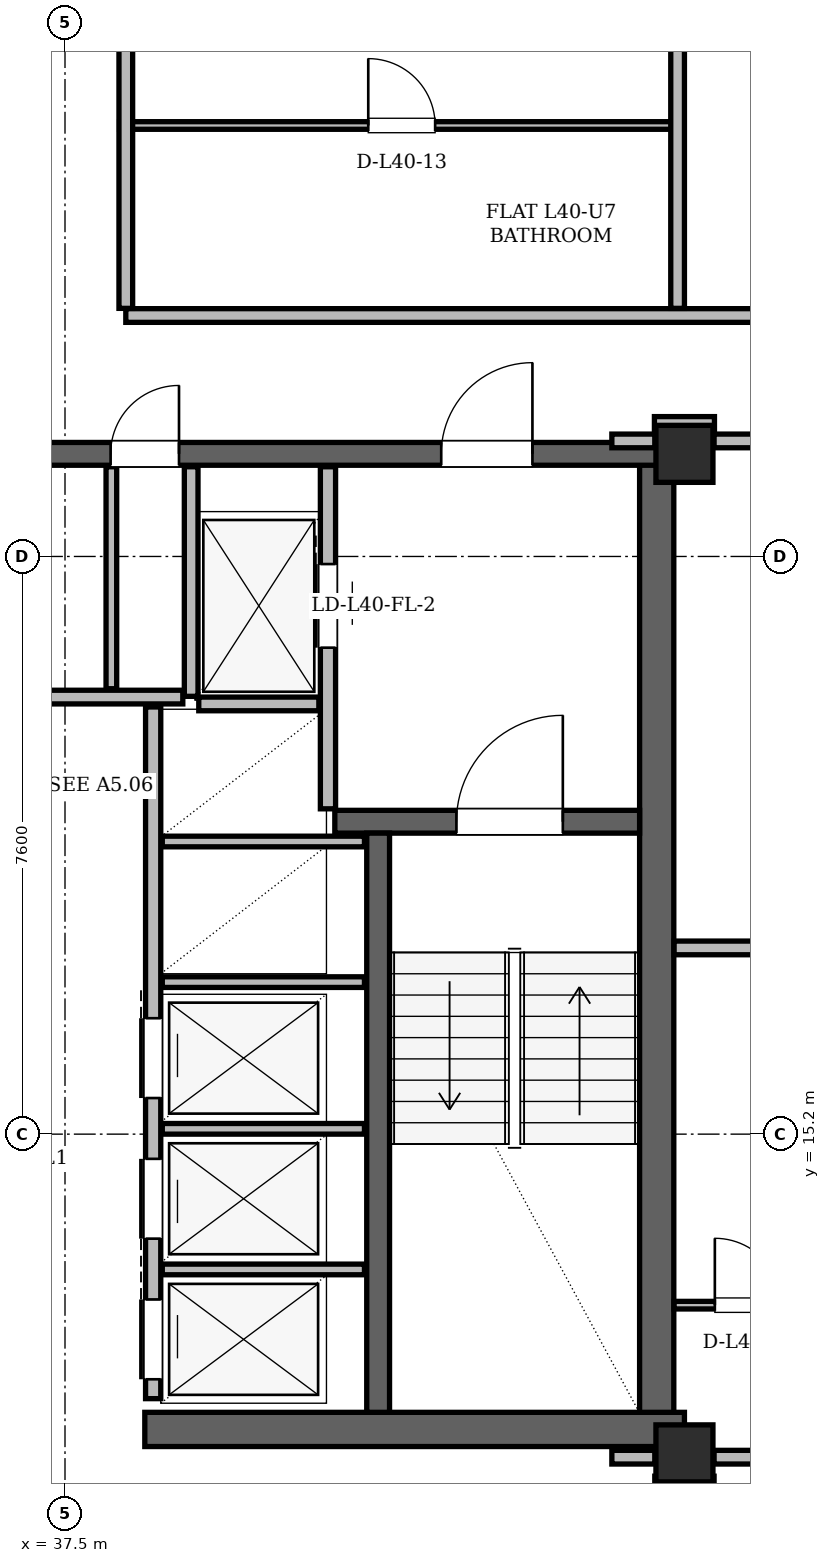
"""IFC4 building model, lengths in metres.
Left out: names, types, materials, properties, quantities, classifications, styles, units other than length and angle.
Written with IfcOpenShell. Run it as: python <this file> out.ifc"""

import sys

from ifc_helpers import new_model, si_unit, direction, frame, frame_2d, origin, origin_2d, place, context, subcontext, project, spatial, rectangle, hollow_rectangle, extrude, element, fill, save


model = new_model("IFC4")
c1 = context("Model", 3, precision=1e-05, world=origin(), true_north=direction((0.0, 1.0)))
c2 = subcontext(c1, "Body", "Model", "MODEL_VIEW")
j1 = project(units=[si_unit("LENGTHUNIT", "METRE"), si_unit("PLANEANGLEUNIT", "RADIAN")], contexts=[c1])
p1 = place(None, origin())
s1 = spatial("IfcSite", under=j1, at=p1, CompositionType="ELEMENT")
p2 = place(p1, origin())
s2 = spatial("IfcBuilding", under=s1, at=p2, CompositionType="ELEMENT")
p3 = place(p2, frame((0.0, 0.0, 153.0)))
s3 = spatial("IfcBuildingStorey", under=s2, at=p3, CompositionType="ELEMENT", Elevation=153.0)
for number, where, z_axis, x_axis in (
    (1, (45.65, 11.0, 0.0), (0.0, 0.0, 1.0), (1.0, 0.0, 0.0)),
    (2, (45.65, 24.15, 0.0), (0.0, 0.0, 1.0), (1.0, 0.0, 0.0)),
):
    element("IfcColumn", number, at=place(p3, frame(where, z_axis=z_axis, x_axis=x_axis)), inside=s3, PredefinedType="COLUMN", context=c2, shape_type="SweptSolid", body=[
        extrude(hollow_rectangle(XDim=0.75, YDim=0.75, WallThickness=0.06, at=origin_2d()), origin(), (0.0, 0.0, 1.0), 3.6),
    ])
p4 = place(p3, frame((45.285, 11.0, 0.0), z_axis=(0.0, 0.0, 1.0), x_axis=(0.0, 1.0, 0.0)))
e3 = element("IfcWall", 3, at=p4, inside=s3, PredefinedType="SHEAR", context=c2, shape_type="SweptSolid", body=[
    extrude(rectangle(XDim=13.3, YDim=0.45, at=frame_2d((6.65, 0.0))), origin(), (0.0, 0.0, 1.0), 3.38),
])
p5 = place(p3, frame((38.55, 11.315, 0.0), z_axis=(0.0, 0.0, 1.0), x_axis=(1.0, 0.0, 0.0)))
e4 = element("IfcWall", 4, at=p5, inside=s3, PredefinedType="SHEAR", context=c2, shape_type="SweptSolid", body=[
    extrude(rectangle(XDim=7.1, YDim=0.45, at=frame_2d((3.55, 0.0))), origin(), (0.0, 0.0, 1.0), 3.38),
])
p6 = place(p3, frame((29.65, 24.15, 0.0), z_axis=(0.0, 0.0, 1.0), x_axis=(1.0, 0.0, 0.0)))
e5 = element("IfcWall", 5, at=p6, inside=s3, PredefinedType="SHEAR", context=c2, shape_type="SweptSolid", body=[
    extrude(rectangle(XDim=15.7, YDim=0.3, at=frame_2d((7.85, 0.0))), origin(), (0.0, 0.0, 1.0), 3.38),
])
p7 = place(p6, frame((1.7, 0.0, 0.0)))
e6 = element("IfcOpeningElement", 6, at=p7, cuts=e5, PredefinedType="OPENING", context=c2, shape_type="SweptSolid", body=[
    extrude(rectangle(XDim=1.2, YDim=2.2, at=frame_2d((0.6, 1.1))), frame((0.0, 0.15, 0.0), z_axis=(0.0, -1.0, 0.0), x_axis=(1.0, 0.0, 0.0)), (0.0, 0.0, 1.0), 0.3),
])
p8 = place(p6, frame((12.8, 0.0, 0.0)))
e7 = element("IfcOpeningElement", 7, at=p8, cuts=e5, PredefinedType="OPENING", context=c2, shape_type="SweptSolid", body=[
    extrude(rectangle(XDim=1.2, YDim=2.2, at=frame_2d((0.6, 1.1))), frame((0.0, 0.15, 0.0), z_axis=(0.0, -1.0, 0.0), x_axis=(1.0, 0.0, 0.0)), (0.0, 0.0, 1.0), 0.3),
])
p9 = place(p6, frame((6.55, 0.0, 0.0)))
e8 = element("IfcOpeningElement", 8, at=p9, cuts=e5, PredefinedType="OPENING", context=c2, shape_type="SweptSolid", body=[
    extrude(rectangle(XDim=0.9, YDim=2.05, at=frame_2d((0.45, 1.025))), frame((0.0, 0.15, 0.0), z_axis=(0.0, -1.0, 0.0), x_axis=(1.0, 0.0, 0.0)), (0.0, 0.0, 1.0), 0.3),
])
p10 = place(p6, frame((8.45, 0.0, 0.0)))
e9 = element("IfcOpeningElement", 9, at=p10, cuts=e5, PredefinedType="OPENING", context=c2, shape_type="SweptSolid", body=[
    extrude(rectangle(XDim=0.9, YDim=2.05, at=frame_2d((0.45, 1.025))), frame((0.0, 0.15, 0.0), z_axis=(0.0, -1.0, 0.0), x_axis=(1.0, 0.0, 0.0)), (0.0, 0.0, 1.0), 0.3),
])
p11 = place(p3, frame((41.05, 19.31, 0.0), z_axis=(0.0, 0.0, 1.0), x_axis=(1.0, 0.0, 0.0)))
e10 = element("IfcWall", 10, at=p11, inside=s3, PredefinedType="SHEAR", context=c2, shape_type="SweptSolid", body=[
    extrude(rectangle(XDim=4.01, YDim=0.3, at=frame_2d((2.005, 0.0))), origin(), (0.0, 0.0, 1.0), 3.38),
])
p12 = place(p11, frame((1.6, 0.0, 0.0)))
e11 = element("IfcOpeningElement", 11, at=p12, cuts=e10, PredefinedType="OPENING", context=c2, shape_type="SweptSolid", body=[
    extrude(rectangle(XDim=1.4, YDim=2.2, at=frame_2d((0.7, 1.1))), frame((0.0, 0.15, 0.0), z_axis=(0.0, -1.0, 0.0), x_axis=(1.0, 0.0, 0.0)), (0.0, 0.0, 1.0), 0.3),
])
p13 = place(p3, frame((41.62, 11.54, 0.0), z_axis=(0.0, 0.0, 1.0), x_axis=(0.0, 1.0, 0.0)))
e12 = element("IfcWall", 12, at=p13, inside=s3, PredefinedType="SHEAR", context=c2, shape_type="SweptSolid", body=[
    extrude(rectangle(XDim=7.62, YDim=0.3, at=frame_2d((3.81, 0.0))), origin(), (0.0, 0.0, 1.0), 3.38),
])
p14 = place(p3, frame((59.952, 12.544, 0.0), z_axis=(0.0, 0.0, 1.0), x_axis=(-0.500000946011, 0.866024857604, 0.0)))
e13 = element("IfcWall", 13, at=p14, inside=s3, PredefinedType="SOLIDWALL", context=c2, shape_type="SweptSolid", body=[
    extrude(rectangle(XDim=35.54, YDim=0.34, at=frame_2d((17.77, 0.0))), origin(), (0.0, 0.0, 1.0), 2.6),
])
p15 = place(p14, frame((6.579, 0.0, 0.0)))
e14 = element("IfcOpeningElement", 14, at=p15, cuts=e13, PredefinedType="OPENING", context=c2, shape_type="SweptSolid", body=[
    extrude(rectangle(XDim=1.5, YDim=2.2, at=frame_2d((0.75, 1.1))), frame((0.0, 0.17, 0.0), z_axis=(0.0, -1.0, 0.0), x_axis=(1.0, 0.0, 0.0)), (0.0, 0.0, 1.0), 0.34),
])
p16 = place(p14, frame((26.105, 0.0, 0.0)))
e15 = element("IfcOpeningElement", 15, at=p16, cuts=e13, PredefinedType="OPENING", context=c2, shape_type="SweptSolid", body=[
    extrude(rectangle(XDim=1.3, YDim=2.2, at=frame_2d((0.65, 1.1))), frame((0.0, 0.17, 0.0), z_axis=(0.0, -1.0, 0.0), x_axis=(1.0, 0.0, 0.0)), (0.0, 0.0, 1.0), 0.34),
])
p17 = place(p14, frame((0.816, 0.0, 0.85)))
e16 = element("IfcOpeningElement", 16, at=p17, cuts=e13, PredefinedType="OPENING", context=c2, shape_type="SweptSolid", body=[
    extrude(rectangle(XDim=1.2, YDim=1.48, at=frame_2d((0.6, 0.74))), frame((0.0, 0.17, 0.0), z_axis=(0.0, -1.0, 0.0), x_axis=(1.0, 0.0, 0.0)), (0.0, 0.0, 1.0), 0.34),
])
p18 = place(p14, frame((17.181, 0.0, 0.85)))
e17 = element("IfcOpeningElement", 17, at=p18, cuts=e13, PredefinedType="OPENING", context=c2, shape_type="SweptSolid", body=[
    extrude(rectangle(XDim=2.6, YDim=1.64, at=frame_2d((1.3, 0.82))), frame((0.0, 0.17, 0.0), z_axis=(0.0, -1.0, 0.0), x_axis=(1.0, 0.0, 0.0)), (0.0, 0.0, 1.0), 0.34),
])
p19 = place(p14, frame((22.978, 0.0, 0.85)))
e18 = element("IfcOpeningElement", 18, at=p19, cuts=e13, PredefinedType="OPENING", context=c2, shape_type="SweptSolid", body=[
    extrude(rectangle(XDim=1.2, YDim=1.48, at=frame_2d((0.6, 0.74))), frame((0.0, 0.17, 0.0), z_axis=(0.0, -1.0, 0.0), x_axis=(1.0, 0.0, 0.0)), (0.0, 0.0, 1.0), 0.34),
])
p20 = place(p14, frame((13.303, 0.0, 0.85)))
e19 = element("IfcOpeningElement", 19, at=p20, cuts=e13, PredefinedType="OPENING", context=c2, shape_type="SweptSolid", body=[
    extrude(rectangle(XDim=1.6, YDim=1.64, at=frame_2d((0.8, 0.82))), frame((0.0, 0.17, 0.0), z_axis=(0.0, -1.0, 0.0), x_axis=(1.0, 0.0, 0.0)), (0.0, 0.0, 1.0), 0.34),
])
p21 = place(p14, frame((31.32, 0.0, 0.85)))
e20 = element("IfcOpeningElement", 20, at=p21, cuts=e13, PredefinedType="OPENING", context=c2, shape_type="SweptSolid", body=[
    extrude(rectangle(XDim=3.0, YDim=1.64, at=frame_2d((1.5, 0.82))), frame((0.0, 0.17, 0.0), z_axis=(0.0, -1.0, 0.0), x_axis=(1.0, 0.0, 0.0)), (0.0, 0.0, 1.0), 0.34),
])
p22 = place(p3, frame((40.96, 19.48, 0.0), z_axis=(0.0, 0.0, 1.0), x_axis=(0.0, 1.0, 0.0)))
e21 = element("IfcWall", 21, at=p22, inside=s3, PredefinedType="PARTITIONING", context=c2, shape_type="SweptSolid", body=[
    extrude(rectangle(XDim=4.5, YDim=0.2, at=frame_2d((2.25, 0.0))), origin(), (0.0, 0.0, 1.0), 2.42),
])
p23 = place(p22, frame((2.12, 0.0, 0.0)))
e22 = element("IfcOpeningElement", 22, at=p23, cuts=e21, PredefinedType="OPENING", context=c2, shape_type="SweptSolid", body=[
    extrude(rectangle(XDim=1.1, YDim=2.2, at=frame_2d((0.55, 1.1))), frame((0.0, 0.1, 0.0), z_axis=(0.0, -1.0, 0.0), x_axis=(1.0, 0.0, 0.0)), (0.0, 0.0, 1.0), 0.2),
])
p24 = place(p3, frame((39.16, 20.96, 0.0), z_axis=(0.0, 0.0, 1.0), x_axis=(0.0, 1.0, 0.0)))
e23 = element("IfcWall", 23, at=p24, inside=s3, PredefinedType="PARTITIONING", context=c2, shape_type="SweptSolid", body=[
    extrude(rectangle(XDim=3.02, YDim=0.18, at=frame_2d((1.51, 0.0))), origin(), (0.0, 0.0, 1.0), 2.42),
])
p25 = place(p3, frame((39.26, 20.86, 0.0), z_axis=(0.0, 0.0, 1.0), x_axis=(1.0, 0.0, 0.0)))
e24 = element("IfcWall", 24, at=p25, inside=s3, PredefinedType="PARTITIONING", context=c2, shape_type="SweptSolid", body=[
    extrude(rectangle(XDim=1.58, YDim=0.18, at=frame_2d((0.79, 0.0))), origin(), (0.0, 0.0, 1.0), 3.38),
])
p26 = place(p3, frame((38.66, 11.72, 0.0), z_axis=(0.0, 0.0, 1.0), x_axis=(0.0, 1.0, 0.0)))
e25 = element("IfcWall", 25, at=p26, inside=s3, PredefinedType="PARTITIONING", context=c2, shape_type="SweptSolid", body=[
    extrude(rectangle(XDim=9.1, YDim=0.2, at=frame_2d((4.55, 0.0))), origin(), (0.0, 0.0, 1.0), 3.38),
])
p27 = place(p26, frame((0.255, 0.0, 0.0)))
e26 = element("IfcOpeningElement", 26, at=p27, cuts=e25, PredefinedType="OPENING", context=c2, shape_type="SweptSolid", body=[
    extrude(rectangle(XDim=1.05, YDim=2.15, at=frame_2d((0.525, 1.075))), frame((0.0, 0.1, 0.0), z_axis=(0.0, -1.0, 0.0), x_axis=(1.0, 0.0, 0.0)), (0.0, 0.0, 1.0), 0.2),
])
p28 = place(p26, frame((2.105, 0.0, 0.0)))
e27 = element("IfcOpeningElement", 27, at=p28, cuts=e25, PredefinedType="OPENING", context=c2, shape_type="SweptSolid", body=[
    extrude(rectangle(XDim=1.05, YDim=2.15, at=frame_2d((0.525, 1.075))), frame((0.0, 0.1, 0.0), z_axis=(0.0, -1.0, 0.0), x_axis=(1.0, 0.0, 0.0)), (0.0, 0.0, 1.0), 0.2),
])
p29 = place(p26, frame((3.955, 0.0, 0.0)))
e28 = element("IfcOpeningElement", 28, at=p29, cuts=e25, PredefinedType="OPENING", context=c2, shape_type="SweptSolid", body=[
    extrude(rectangle(XDim=1.05, YDim=2.15, at=frame_2d((0.525, 1.075))), frame((0.0, 0.1, 0.0), z_axis=(0.0, -1.0, 0.0), x_axis=(1.0, 0.0, 0.0)), (0.0, 0.0, 1.0), 0.2),
])
for number, where, z_axis, x_axis in (
    (29, (38.78, 13.42, 0.0), (0.0, 0.0, 1.0), (1.0, 0.0, 0.0)),
    (30, (38.78, 15.27, 0.0), (0.0, 0.0, 1.0), (1.0, 0.0, 0.0)),
    (31, (38.78, 17.2, 0.0), (0.0, 0.0, 1.0), (1.0, 0.0, 0.0)),
    (32, (38.78, 19.05, 0.0), (0.0, 0.0, 1.0), (1.0, 0.0, 0.0)),
):
    element("IfcWall", number, at=place(p3, frame(where, z_axis=z_axis, x_axis=x_axis)), inside=s3, PredefinedType="PARTITIONING", context=c2, shape_type="SweptSolid", body=[
        extrude(rectangle(XDim=2.66, YDim=0.14, at=frame_2d((1.33, 0.0))), origin(), (0.0, 0.0, 1.0), 3.38),
    ])
p30 = place(p3, frame((35.95, 20.95, 0.0), z_axis=(0.0, 0.0, 1.0), x_axis=(1.0, 0.0, 0.0)))
e33 = element("IfcWall", 33, at=p30, inside=s3, PredefinedType="PARTITIONING", context=c2, shape_type="SweptSolid", body=[
    extrude(rectangle(XDim=3.1, YDim=0.18, at=frame_2d((1.55, 0.0))), origin(), (0.0, 0.0, 1.0), 3.38),
])
p31 = place(p3, frame((38.11, 21.06, 0.0), z_axis=(0.0, 0.0, 1.0), x_axis=(0.0, 1.0, 0.0)))
e34 = element("IfcWall", 34, at=p31, inside=s3, PredefinedType="PARTITIONING", context=c2, shape_type="SweptSolid", body=[
    extrude(rectangle(XDim=2.92, YDim=0.14, at=frame_2d((1.46, 0.0))), origin(), (0.0, 0.0, 1.0), 2.42),
])
p32 = place(p3, frame((45.26, 10.61, 0.0), z_axis=(0.0, 0.0, 1.0), x_axis=(1.0, 0.0, 0.0)))
e35 = element("IfcWall", 35, at=p32, inside=s3, PredefinedType="PARTITIONING", context=c2, shape_type="SweptSolid", body=[
    extrude(rectangle(XDim=0.78, YDim=0.18, at=frame_2d((0.39, 0.0))), origin(), (0.0, 0.0, 1.0), 3.38),
])
p33 = place(p3, frame((44.695, 10.95, 0.0), z_axis=(0.0, 0.0, 1.0), x_axis=(1.0, 0.0, 0.0)))
e36 = element("IfcWall", 36, at=p33, inside=s3, PredefinedType="PARTITIONING", context=c2, shape_type="SweptSolid", body=[
    extrude(rectangle(XDim=0.565, YDim=0.18, at=frame_2d((0.282, 0.0))), origin(), (0.0, 0.0, 1.0), 2.42),
])
p34 = place(p3, frame((46.04, 10.95, 0.0), z_axis=(0.0, 0.0, 1.0), x_axis=(1.0, 0.0, 0.0)))
e37 = element("IfcWall", 37, at=p34, inside=s3, PredefinedType="PARTITIONING", context=c2, shape_type="SweptSolid", body=[
    extrude(rectangle(XDim=3.96, YDim=0.18, at=frame_2d((1.98, 0.0))), origin(), (0.0, 0.0, 1.0), 2.842),
])
p35 = place(p3, frame((45.514, 12.95, 0.0), z_axis=(0.0, 0.0, 1.0), x_axis=(1.0, 0.0, 0.0)))
e38 = element("IfcWall", 38, at=p35, inside=s3, PredefinedType="PARTITIONING", context=c2, shape_type="SweptSolid", body=[
    extrude(rectangle(XDim=14.003, YDim=0.1, at=frame_2d((7.001, 0.0))), origin(), (0.0, 0.0, 1.0), 2.42),
])
p36 = place(p35, frame((0.536, 0.0, 0.0)))
e39 = element("IfcOpeningElement", 39, at=p36, cuts=e38, PredefinedType="OPENING", context=c2, shape_type="SweptSolid", body=[
    extrude(rectangle(XDim=0.88, YDim=2.08, at=frame_2d((0.44, 1.04))), frame((0.0, 0.05, 0.0), z_axis=(0.0, -1.0, 0.0), x_axis=(1.0, 0.0, 0.0)), (0.0, 0.0, 1.0), 0.1),
])
p37 = place(p35, frame((2.538, 0.0, 0.0)))
e40 = element("IfcOpeningElement", 40, at=p37, cuts=e38, PredefinedType="OPENING", context=c2, shape_type="SweptSolid", body=[
    extrude(rectangle(XDim=0.95, YDim=2.1, at=frame_2d((0.475, 1.05))), frame((0.0, 0.05, 0.0), z_axis=(0.0, -1.0, 0.0), x_axis=(1.0, 0.0, 0.0)), (0.0, 0.0, 1.0), 0.1),
])
p38 = place(p35, frame((8.616, 0.0, 0.0)))
e41 = element("IfcOpeningElement", 41, at=p38, cuts=e38, PredefinedType="OPENING", context=c2, shape_type="SweptSolid", body=[
    extrude(rectangle(XDim=0.92, YDim=2.12, at=frame_2d((0.46, 1.06))), frame((0.0, 0.05, 0.0), z_axis=(0.0, -1.0, 0.0), x_axis=(1.0, 0.0, 0.0)), (0.0, 0.0, 1.0), 0.1),
])
p39 = place(p3, frame((45.514, 17.65, 0.0), z_axis=(0.0, 0.0, 1.0), x_axis=(1.0, 0.0, 0.0)))
e42 = element("IfcWall", 42, at=p39, inside=s3, PredefinedType="PARTITIONING", context=c2, shape_type="SweptSolid", body=[
    extrude(rectangle(XDim=11.289, YDim=0.18, at=frame_2d((5.645, 0.0))), origin(), (0.0, 0.0, 1.0), 2.42),
])
p40 = place(p3, frame((44.695, 24.32, 0.0), z_axis=(0.0, 0.0, 1.0), x_axis=(1.0, 0.0, 0.0)))
e43 = element("IfcWall", 43, at=p40, inside=s3, PredefinedType="PARTITIONING", context=c2, shape_type="SweptSolid", body=[
    extrude(rectangle(XDim=0.565, YDim=0.18, at=frame_2d((0.282, 0.0))), origin(), (0.0, 0.0, 1.0), 2.42),
])
p41 = place(p3, frame((46.04, 24.32, 0.0), z_axis=(0.0, 0.0, 1.0), x_axis=(1.0, 0.0, 0.0)))
e44 = element("IfcWall", 44, at=p41, inside=s3, PredefinedType="PARTITIONING", context=c2, shape_type="SweptSolid", body=[
    extrude(rectangle(XDim=3.96, YDim=0.18, at=frame_2d((1.98, 0.0))), origin(), (0.0, 0.0, 1.0), 3.38),
])
p42 = place(p3, frame((45.255, 24.55, 0.0), z_axis=(0.0, 0.0, 1.0), x_axis=(1.0, 0.0, 0.0)))
e45 = element("IfcWall", 45, at=p42, inside=s3, PredefinedType="PARTITIONING", context=c2, shape_type="SweptSolid", body=[
    extrude(rectangle(XDim=0.79, YDim=0.18, at=frame_2d((0.395, 0.0))), origin(), (0.0, 0.0, 1.0), 2.842),
])
p43 = place(p3, frame((38.3, 25.97, 0.0), z_axis=(0.0, 0.0, 1.0), x_axis=(1.0, 0.0, 0.0)))
e46 = element("IfcWall", 46, at=p43, inside=s3, PredefinedType="PARTITIONING", context=c2, shape_type="SweptSolid", body=[
    extrude(rectangle(XDim=11.7, YDim=0.18, at=frame_2d((5.85, 0.0))), origin(), (0.0, 0.0, 1.0), 2.842),
])
p44 = place(p43, frame((9.832, 0.0, 0.0)))
e47 = element("IfcOpeningElement", 47, at=p44, cuts=e46, PredefinedType="OPENING", context=c2, shape_type="SweptSolid", body=[
    extrude(rectangle(XDim=1.0, YDim=2.18, at=frame_2d((0.5, 1.09))), frame((0.0, 0.09, 0.0), z_axis=(0.0, -1.0, 0.0), x_axis=(1.0, 0.0, 0.0)), (0.0, 0.0, 1.0), 0.18),
])
p45 = place(p3, frame((38.218, 28.47, 0.0), z_axis=(0.0, 0.0, 1.0), x_axis=(1.0, 0.0, 0.0)))
e48 = element("IfcWall", 48, at=p45, inside=s3, PredefinedType="PARTITIONING", context=c2, shape_type="SweptSolid", body=[
    extrude(rectangle(XDim=7.424, YDim=0.1, at=frame_2d((3.712, 0.0))), origin(), (0.0, 0.0, 1.0), 3.38),
])
p46 = place(p45, frame((3.272, 0.0, 0.0)))
e49 = element("IfcOpeningElement", 49, at=p46, cuts=e48, PredefinedType="OPENING", context=c2, shape_type="SweptSolid", body=[
    extrude(rectangle(XDim=0.88, YDim=2.08, at=frame_2d((0.44, 1.04))), frame((0.0, 0.05, 0.0), z_axis=(0.0, -1.0, 0.0), x_axis=(1.0, 0.0, 0.0)), (0.0, 0.0, 1.0), 0.1),
])
p47 = place(p3, frame((38.3, 26.064, 0.0), z_axis=(0.0, 0.0, 1.0), x_axis=(0.0, 1.0, 0.0)))
e50 = element("IfcWall", 50, at=p47, inside=s3, PredefinedType="PARTITIONING", context=c2, shape_type="SweptSolid", body=[
    extrude(rectangle(XDim=13.442, YDim=0.18, at=frame_2d((6.721, 0.0))), origin(), (0.0, 0.0, 1.0), 3.38),
])
p48 = place(p47, frame((7.149, 0.0, 0.0)))
e51 = element("IfcOpeningElement", 51, at=p48, cuts=e50, PredefinedType="OPENING", context=c2, shape_type="SweptSolid", body=[
    extrude(rectangle(XDim=1.0, YDim=2.18, at=frame_2d((0.5, 1.09))), frame((0.0, 0.09, 0.0), z_axis=(0.0, -1.0, 0.0), x_axis=(1.0, 0.0, 0.0)), (0.0, 0.0, 1.0), 0.18),
])
p49 = place(p3, frame((45.56, 26.064, 0.0), z_axis=(0.0, 0.0, 1.0), x_axis=(0.0, 1.0, 0.0)))
e52 = element("IfcWall", 52, at=p49, inside=s3, PredefinedType="PARTITIONING", context=c2, shape_type="SweptSolid", body=[
    extrude(rectangle(XDim=11.06, YDim=0.18, at=frame_2d((5.53, 0.0))), origin(), (0.0, 0.0, 1.0), 3.38),
])
p50 = place(p23, origin())
e53 = element("IfcDoor", 53, at=p50, inside=s3, OperationType="SLIDING_TO_RIGHT", PredefinedType="DOOR", context=c2, shape_type="SweptSolid", body=[
    extrude(rectangle(XDim=1.1, YDim=2.2, at=frame_2d((0.55, 1.1))), frame((0.0, 0.025, 0.0), z_axis=(0.0, -1.0, 0.0), x_axis=(1.0, 0.0, 0.0)), (0.0, 0.0, 1.0), 0.05),
])
fill(e22, e53)
p51 = place(p27, origin())
e54 = element("IfcDoor", 54, at=p51, inside=s3, OperationType="SLIDING_TO_RIGHT", PredefinedType="DOOR", context=c2, shape_type="SweptSolid", body=[
    extrude(rectangle(XDim=1.05, YDim=2.15, at=frame_2d((0.525, 1.075))), frame((0.0, 0.025, 0.0), z_axis=(0.0, -1.0, 0.0), x_axis=(1.0, 0.0, 0.0)), (0.0, 0.0, 1.0), 0.05),
])
fill(e26, e54)
p52 = place(p28, origin())
e55 = element("IfcDoor", 55, at=p52, inside=s3, OperationType="SLIDING_TO_LEFT", PredefinedType="DOOR", context=c2, shape_type="SweptSolid", body=[
    extrude(rectangle(XDim=1.05, YDim=2.15, at=frame_2d((0.525, 1.075))), frame((0.0, 0.025, 0.0), z_axis=(0.0, -1.0, 0.0), x_axis=(1.0, 0.0, 0.0)), (0.0, 0.0, 1.0), 0.05),
])
fill(e27, e55)
p53 = place(p29, origin())
e56 = element("IfcDoor", 56, at=p53, inside=s3, OperationType="SLIDING_TO_RIGHT", PredefinedType="DOOR", context=c2, shape_type="SweptSolid", body=[
    extrude(rectangle(XDim=1.05, YDim=2.15, at=frame_2d((0.525, 1.075))), frame((0.0, 0.025, 0.0), z_axis=(0.0, -1.0, 0.0), x_axis=(1.0, 0.0, 0.0)), (0.0, 0.0, 1.0), 0.05),
])
fill(e28, e56)
p54 = place(p12, origin())
e57 = element("IfcDoor", 57, at=p54, inside=s3, OperationType="SINGLE_SWING_RIGHT", PredefinedType="DOOR", context=c2, shape_type="SweptSolid", body=[
    extrude(rectangle(XDim=1.4, YDim=2.2, at=frame_2d((0.7, 1.1))), frame((0.0, 0.025, 0.0), z_axis=(0.0, -1.0, 0.0), x_axis=(1.0, 0.0, 0.0)), (0.0, 0.0, 1.0), 0.05),
])
fill(e11, e57)
p55 = place(p8, origin())
e58 = element("IfcDoor", 58, at=p55, inside=s3, OperationType="SINGLE_SWING_RIGHT", PredefinedType="DOOR", context=c2, shape_type="SweptSolid", body=[
    extrude(rectangle(XDim=1.2, YDim=2.2, at=frame_2d((0.6, 1.1))), frame((0.0, 0.025, 0.0), z_axis=(0.0, -1.0, 0.0), x_axis=(1.0, 0.0, 0.0)), (0.0, 0.0, 1.0), 0.05),
])
fill(e7, e58)
p56 = place(p10, origin())
e59 = element("IfcDoor", 59, at=p56, inside=s3, OperationType="SINGLE_SWING_RIGHT", PredefinedType="DOOR", context=c2, shape_type="SweptSolid", body=[
    extrude(rectangle(XDim=0.9, YDim=2.05, at=frame_2d((0.45, 1.025))), frame((0.0, 0.025, 0.0), z_axis=(0.0, -1.0, 0.0), x_axis=(1.0, 0.0, 0.0)), (0.0, 0.0, 1.0), 0.05),
])
fill(e9, e59)
p57 = place(p36, origin())
e60 = element("IfcDoor", 60, at=p57, inside=s3, OperationType="SINGLE_SWING_LEFT", PredefinedType="DOOR", context=c2, shape_type="SweptSolid", body=[
    extrude(rectangle(XDim=0.88, YDim=2.08, at=frame_2d((0.44, 1.04))), frame((0.0, 0.025, 0.0), z_axis=(0.0, -1.0, 0.0), x_axis=(1.0, 0.0, 0.0)), (0.0, 0.0, 1.0), 0.05),
])
fill(e39, e60)
p58 = place(p46, origin())
e61 = element("IfcDoor", 61, at=p58, inside=s3, OperationType="SINGLE_SWING_LEFT", PredefinedType="DOOR", context=c2, shape_type="SweptSolid", body=[
    extrude(rectangle(XDim=0.88, YDim=2.08, at=frame_2d((0.44, 1.04))), frame((0.0, 0.025, 0.0), z_axis=(0.0, -1.0, 0.0), x_axis=(1.0, 0.0, 0.0)), (0.0, 0.0, 1.0), 0.05),
])
fill(e49, e61)
save(model, sys.argv[1])
